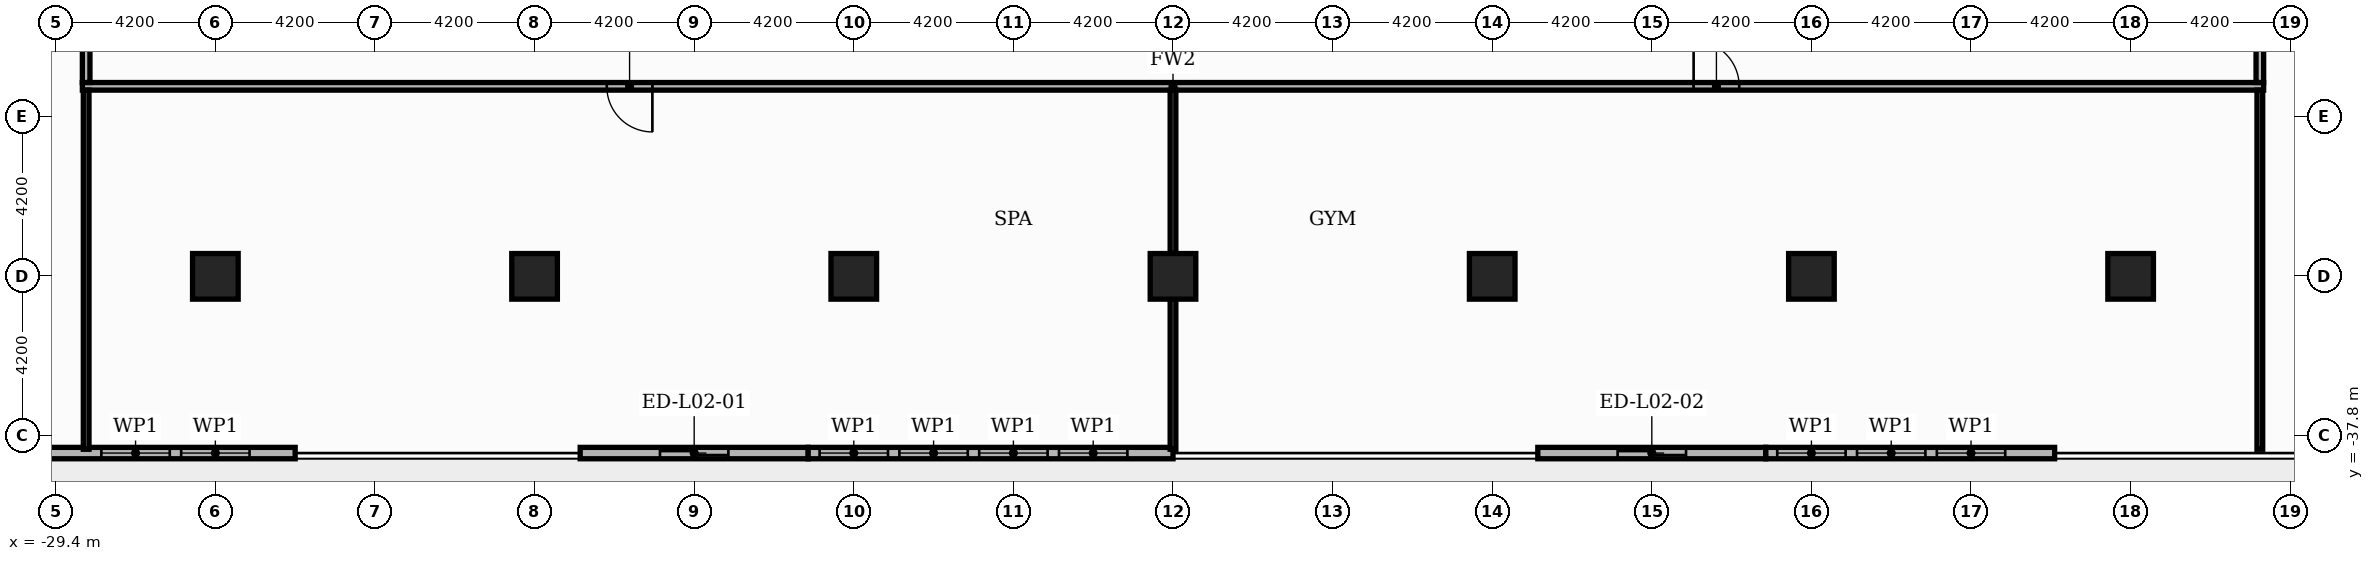
"""IFC4 building model, lengths in metres.
Left out: names, types, materials, properties, quantities, classifications, styles, units other than length and angle.
Written with IfcOpenShell. Run it as: python <this file> out.ifc"""

import sys

from ifc_helpers import new_model, si_unit, direction, frame, frame_2d, origin, origin_2d, place, context, subcontext, project, spatial, rectangle, extrude, element, fill, save


model = new_model("IFC4")
c1 = context("Model", 3, precision=1e-05, world=origin(), true_north=direction((0.0, 1.0)))
c2 = subcontext(c1, "Body", "Model", "MODEL_VIEW")
j1 = project(units=[si_unit("LENGTHUNIT", "METRE"), si_unit("PLANEANGLEUNIT", "RADIAN")], contexts=[c1])
p1 = place(None, origin())
s1 = spatial("IfcSite", under=j1, at=p1, CompositionType="ELEMENT")
p2 = place(p1, origin())
s2 = spatial("IfcBuilding", under=s1, at=p2, CompositionType="ELEMENT")
p3 = place(p2, frame((0.0, 0.0, 12.0)))
s3 = spatial("IfcBuildingStorey", under=s2, at=p3, CompositionType="ELEMENT", Elevation=12.0)
for number, where, z_axis, x_axis in (
    (1, (0.0, -33.6, 0.0), (0.0, 0.0, 1.0), (1.0, 0.0, 0.0)),
    (2, (8.4, -33.6, 0.0), (0.0, 0.0, 1.0), (1.0, 0.0, 0.0)),
    (3, (16.8, -33.6, 0.0), (0.0, 0.0, 1.0), (1.0, 0.0, 0.0)),
    (4, (25.2, -33.6, 0.0), (0.0, 0.0, 1.0), (1.0, 0.0, 0.0)),
    (5, (-8.4, -33.6, 0.0), (0.0, 0.0, 1.0), (1.0, 0.0, 0.0)),
    (6, (-16.8, -33.6, 0.0), (0.0, 0.0, 1.0), (1.0, 0.0, 0.0)),
    (7, (-25.2, -33.6, 0.0), (0.0, 0.0, 1.0), (1.0, 0.0, 0.0)),
):
    element("IfcColumn", number, at=place(p3, frame(where, z_axis=z_axis, x_axis=x_axis)), inside=s3, PredefinedType="COLUMN", context=c2, shape_type="SweptSolid", body=[
        extrude(rectangle(XDim=1.2, YDim=1.2, at=origin_2d()), origin(), (0.0, 0.0, 1.0), 4.8),
    ])
p4 = place(p3, frame((-30.6, -38.25, 0.0), z_axis=(0.0, 0.0, 1.0), x_axis=(1.0, 0.0, 0.0)))
e8 = element("IfcWall", 8, at=p4, inside=s3, PredefinedType="STANDARD", context=c2, shape_type="SweptSolid", body=[
    extrude(rectangle(XDim=7.5, YDim=0.3, at=frame_2d((3.75, 0.0))), origin(), (0.0, 0.0, 1.0), 4.38),
])
p5 = place(p4, frame((2.4, 0.0, 0.6)))
e9 = element("IfcOpeningElement", 9, at=p5, cuts=e8, PredefinedType="OPENING", context=c2, shape_type="SweptSolid", body=[
    extrude(rectangle(XDim=1.8, YDim=3.0, at=frame_2d((0.9, 1.5))), frame((0.0, 0.16, 0.0), z_axis=(0.0, -1.0, 0.0), x_axis=(1.0, 0.0, 0.0)), (0.0, 0.0, 1.0), 0.32),
])
p6 = place(p4, frame((4.5, 0.0, 0.6)))
e10 = element("IfcOpeningElement", 10, at=p6, cuts=e8, PredefinedType="OPENING", context=c2, shape_type="SweptSolid", body=[
    extrude(rectangle(XDim=1.8, YDim=3.0, at=frame_2d((0.9, 1.5))), frame((0.0, 0.16, 0.0), z_axis=(0.0, -1.0, 0.0), x_axis=(1.0, 0.0, 0.0)), (0.0, 0.0, 1.0), 0.32),
])
p7 = place(p3, frame((-15.6, -38.25, 0.0), z_axis=(0.0, 0.0, 1.0), x_axis=(1.0, 0.0, 0.0)))
e11 = element("IfcWall", 11, at=p7, inside=s3, PredefinedType="STANDARD", context=c2, shape_type="SweptSolid", body=[
    extrude(rectangle(XDim=6.0, YDim=0.3, at=frame_2d((3.0, 0.0))), origin(), (0.0, 0.0, 1.0), 4.38),
])
p8 = place(p7, frame((2.1, 0.0, 0.0)))
e12 = element("IfcOpeningElement", 12, at=p8, cuts=e11, PredefinedType="OPENING", context=c2, shape_type="SweptSolid", body=[
    extrude(rectangle(XDim=1.8, YDim=2.4, at=frame_2d((0.9, 1.2))), frame((0.0, 0.16, 0.0), z_axis=(0.0, -1.0, 0.0), x_axis=(1.0, 0.0, 0.0)), (0.0, 0.0, 1.0), 0.32),
])
p9 = place(p3, frame((-9.6, -38.25, 0.0), z_axis=(0.0, 0.0, 1.0), x_axis=(1.0, 0.0, 0.0)))
e13 = element("IfcWall", 13, at=p9, inside=s3, PredefinedType="STANDARD", context=c2, shape_type="SweptSolid", body=[
    extrude(rectangle(XDim=9.6, YDim=0.3, at=frame_2d((4.8, 0.0))), origin(), (0.0, 0.0, 1.0), 4.38),
])
p10 = place(p9, frame((0.3, 0.0, 0.6)))
e14 = element("IfcOpeningElement", 14, at=p10, cuts=e13, PredefinedType="OPENING", context=c2, shape_type="SweptSolid", body=[
    extrude(rectangle(XDim=1.8, YDim=3.0, at=frame_2d((0.9, 1.5))), frame((0.0, 0.16, 0.0), z_axis=(0.0, -1.0, 0.0), x_axis=(1.0, 0.0, 0.0)), (0.0, 0.0, 1.0), 0.32),
])
p11 = place(p9, frame((2.4, 0.0, 0.6)))
e15 = element("IfcOpeningElement", 15, at=p11, cuts=e13, PredefinedType="OPENING", context=c2, shape_type="SweptSolid", body=[
    extrude(rectangle(XDim=1.8, YDim=3.0, at=frame_2d((0.9, 1.5))), frame((0.0, 0.16, 0.0), z_axis=(0.0, -1.0, 0.0), x_axis=(1.0, 0.0, 0.0)), (0.0, 0.0, 1.0), 0.32),
])
p12 = place(p9, frame((4.5, 0.0, 0.6)))
e16 = element("IfcOpeningElement", 16, at=p12, cuts=e13, PredefinedType="OPENING", context=c2, shape_type="SweptSolid", body=[
    extrude(rectangle(XDim=1.8, YDim=3.0, at=frame_2d((0.9, 1.5))), frame((0.0, 0.16, 0.0), z_axis=(0.0, -1.0, 0.0), x_axis=(1.0, 0.0, 0.0)), (0.0, 0.0, 1.0), 0.32),
])
p13 = place(p9, frame((6.6, 0.0, 0.6)))
e17 = element("IfcOpeningElement", 17, at=p13, cuts=e13, PredefinedType="OPENING", context=c2, shape_type="SweptSolid", body=[
    extrude(rectangle(XDim=1.8, YDim=3.0, at=frame_2d((0.9, 1.5))), frame((0.0, 0.16, 0.0), z_axis=(0.0, -1.0, 0.0), x_axis=(1.0, 0.0, 0.0)), (0.0, 0.0, 1.0), 0.32),
])
p14 = place(p3, frame((9.6, -38.25, 0.0), z_axis=(0.0, 0.0, 1.0), x_axis=(1.0, 0.0, 0.0)))
e18 = element("IfcWall", 18, at=p14, inside=s3, PredefinedType="STANDARD", context=c2, shape_type="SweptSolid", body=[
    extrude(rectangle(XDim=6.0, YDim=0.3, at=frame_2d((3.0, 0.0))), origin(), (0.0, 0.0, 1.0), 4.38),
])
p15 = place(p14, frame((2.1, 0.0, 0.0)))
e19 = element("IfcOpeningElement", 19, at=p15, cuts=e18, PredefinedType="OPENING", context=c2, shape_type="SweptSolid", body=[
    extrude(rectangle(XDim=1.8, YDim=2.4, at=frame_2d((0.9, 1.2))), frame((0.0, 0.16, 0.0), z_axis=(0.0, -1.0, 0.0), x_axis=(1.0, 0.0, 0.0)), (0.0, 0.0, 1.0), 0.32),
])
p16 = place(p3, frame((15.6, -38.25, 0.0), z_axis=(0.0, 0.0, 1.0), x_axis=(1.0, 0.0, 0.0)))
e20 = element("IfcWall", 20, at=p16, inside=s3, PredefinedType="STANDARD", context=c2, shape_type="SweptSolid", body=[
    extrude(rectangle(XDim=7.6, YDim=0.3, at=frame_2d((3.8, 0.0))), origin(), (0.0, 0.0, 1.0), 4.38),
])
p17 = place(p16, frame((0.3, 0.0, 0.6)))
e21 = element("IfcOpeningElement", 21, at=p17, cuts=e20, PredefinedType="OPENING", context=c2, shape_type="SweptSolid", body=[
    extrude(rectangle(XDim=1.8, YDim=3.0, at=frame_2d((0.9, 1.5))), frame((0.0, 0.16, 0.0), z_axis=(0.0, -1.0, 0.0), x_axis=(1.0, 0.0, 0.0)), (0.0, 0.0, 1.0), 0.32),
])
p18 = place(p16, frame((2.4, 0.0, 0.6)))
e22 = element("IfcOpeningElement", 22, at=p18, cuts=e20, PredefinedType="OPENING", context=c2, shape_type="SweptSolid", body=[
    extrude(rectangle(XDim=1.8, YDim=3.0, at=frame_2d((0.9, 1.5))), frame((0.0, 0.16, 0.0), z_axis=(0.0, -1.0, 0.0), x_axis=(1.0, 0.0, 0.0)), (0.0, 0.0, 1.0), 0.32),
])
p19 = place(p16, frame((4.5, 0.0, 0.6)))
e23 = element("IfcOpeningElement", 23, at=p19, cuts=e20, PredefinedType="OPENING", context=c2, shape_type="SweptSolid", body=[
    extrude(rectangle(XDim=1.8, YDim=3.0, at=frame_2d((0.9, 1.5))), frame((0.0, 0.16, 0.0), z_axis=(0.0, -1.0, 0.0), x_axis=(1.0, 0.0, 0.0)), (0.0, 0.0, 1.0), 0.32),
])
p20 = place(p3, frame((-28.7, -28.6, 0.0), z_axis=(0.0, 0.0, 1.0), x_axis=(1.0, 0.0, 0.0)))
e24 = element("IfcWall", 24, at=p20, inside=s3, PredefinedType="PARTITIONING", context=c2, shape_type="SweptSolid", body=[
    extrude(rectangle(XDim=57.4, YDim=0.2, at=frame_2d((28.7, 0.0))), origin(), (0.0, 0.0, 1.0), 4.08),
])
p21 = place(p20, frame((13.8, 0.0, 0.0)))
e25 = element("IfcOpeningElement", 25, at=p21, cuts=e24, PredefinedType="OPENING", context=c2, shape_type="SweptSolid", body=[
    extrude(rectangle(XDim=1.2, YDim=2.2, at=frame_2d((0.6, 1.1))), frame((0.0, 0.11, 0.0), z_axis=(0.0, -1.0, 0.0), x_axis=(1.0, 0.0, 0.0)), (0.0, 0.0, 1.0), 0.22),
])
p22 = place(p20, frame((42.4, 0.0, 0.0)))
e26 = element("IfcOpeningElement", 26, at=p22, cuts=e24, PredefinedType="OPENING", context=c2, shape_type="SweptSolid", body=[
    extrude(rectangle(XDim=1.2, YDim=2.2, at=frame_2d((0.6, 1.1))), frame((0.0, 0.11, 0.0), z_axis=(0.0, -1.0, 0.0), x_axis=(1.0, 0.0, 0.0)), (0.0, 0.0, 1.0), 0.22),
])
p23 = place(p3, frame((-28.6, -38.15, 0.0), z_axis=(0.0, 0.0, 1.0), x_axis=(0.0, 1.0, 0.0)))
e27 = element("IfcWall", 27, at=p23, inside=s3, PredefinedType="PARTITIONING", context=c2, shape_type="SweptSolid", body=[
    extrude(rectangle(XDim=9.45, YDim=0.15, at=frame_2d((4.725, 0.0))), origin(), (0.0, 0.0, 1.0), 4.18),
])
p24 = place(p3, frame((-28.6, -28.5, 0.0), z_axis=(0.0, 0.0, 1.0), x_axis=(0.0, 1.0, 0.0)))
e28 = element("IfcWall", 28, at=p24, inside=s3, PredefinedType="PARTITIONING", context=c2, shape_type="SweptSolid", body=[
    extrude(rectangle(XDim=57.0, YDim=0.2, at=frame_2d((28.5, 0.0))), origin(), (0.0, 0.0, 1.0), 4.18),
])
p25 = place(p24, frame((9.4, 0.0, 0.0)))
e29 = element("IfcOpeningElement", 29, at=p25, cuts=e28, PredefinedType="OPENING", context=c2, shape_type="SweptSolid", body=[
    extrude(rectangle(XDim=1.2, YDim=2.2, at=frame_2d((0.6, 1.1))), frame((0.0, 0.11, 0.0), z_axis=(0.0, -1.0, 0.0), x_axis=(1.0, 0.0, 0.0)), (0.0, 0.0, 1.0), 0.22),
])
p26 = place(p24, frame((27.9, 0.0, 0.0)))
e30 = element("IfcOpeningElement", 30, at=p26, cuts=e28, PredefinedType="OPENING", context=c2, shape_type="SweptSolid", body=[
    extrude(rectangle(XDim=1.2, YDim=2.2, at=frame_2d((0.6, 1.1))), frame((0.0, 0.11, 0.0), z_axis=(0.0, -1.0, 0.0), x_axis=(1.0, 0.0, 0.0)), (0.0, 0.0, 1.0), 0.22),
])
p27 = place(p24, frame((46.4, 0.0, 0.0)))
e31 = element("IfcOpeningElement", 31, at=p27, cuts=e28, PredefinedType="OPENING", context=c2, shape_type="SweptSolid", body=[
    extrude(rectangle(XDim=1.2, YDim=2.2, at=frame_2d((0.6, 1.1))), frame((0.0, 0.11, 0.0), z_axis=(0.0, -1.0, 0.0), x_axis=(1.0, 0.0, 0.0)), (0.0, 0.0, 1.0), 0.22),
])
p28 = place(p3, frame((0.0, -38.15, 0.0), z_axis=(0.0, 0.0, 1.0), x_axis=(0.0, 1.0, 0.0)))
e32 = element("IfcWall", 32, at=p28, inside=s3, PredefinedType="PARTITIONING", context=c2, shape_type="SweptSolid", body=[
    extrude(rectangle(XDim=3.95, YDim=0.15, at=frame_2d((1.975, 0.0))), origin(), (0.0, 0.0, 1.0), 4.08),
])
p29 = place(p3, frame((0.0, -33.0, 0.0), z_axis=(0.0, 0.0, 1.0), x_axis=(0.0, 1.0, 0.0)))
e33 = element("IfcWall", 33, at=p29, inside=s3, PredefinedType="PARTITIONING", context=c2, shape_type="SweptSolid", body=[
    extrude(rectangle(XDim=4.3, YDim=0.15, at=frame_2d((2.15, 0.0))), origin(), (0.0, 0.0, 1.0), 4.08),
])
p30 = place(p3, frame((28.6, -38.15, 0.0), z_axis=(0.0, 0.0, 1.0), x_axis=(0.0, 1.0, 0.0)))
e34 = element("IfcWall", 34, at=p30, inside=s3, PredefinedType="PARTITIONING", context=c2, shape_type="SweptSolid", body=[
    extrude(rectangle(XDim=9.45, YDim=0.15, at=frame_2d((4.725, 0.0))), origin(), (0.0, 0.0, 1.0), 4.18),
])
p31 = place(p3, frame((28.6, -28.5, 0.0), z_axis=(0.0, 0.0, 1.0), x_axis=(0.0, 1.0, 0.0)))
e35 = element("IfcWall", 35, at=p31, inside=s3, PredefinedType="PARTITIONING", context=c2, shape_type="SweptSolid", body=[
    extrude(rectangle(XDim=57.0, YDim=0.2, at=frame_2d((28.5, 0.0))), origin(), (0.0, 0.0, 1.0), 4.18),
])
p32 = place(p31, frame((7.3, 0.0, 0.0)))
e36 = element("IfcOpeningElement", 36, at=p32, cuts=e35, PredefinedType="OPENING", context=c2, shape_type="SweptSolid", body=[
    extrude(rectangle(XDim=1.2, YDim=2.2, at=frame_2d((0.6, 1.1))), frame((0.0, 0.11, 0.0), z_axis=(0.0, -1.0, 0.0), x_axis=(1.0, 0.0, 0.0)), (0.0, 0.0, 1.0), 0.22),
])
p33 = place(p31, frame((21.6, 0.0, 0.0)))
e37 = element("IfcOpeningElement", 37, at=p33, cuts=e35, PredefinedType="OPENING", context=c2, shape_type="SweptSolid", body=[
    extrude(rectangle(XDim=1.2, YDim=2.2, at=frame_2d((0.6, 1.1))), frame((0.0, 0.11, 0.0), z_axis=(0.0, -1.0, 0.0), x_axis=(1.0, 0.0, 0.0)), (0.0, 0.0, 1.0), 0.22),
])
p34 = place(p31, frame((34.2, 0.0, 0.0)))
e38 = element("IfcOpeningElement", 38, at=p34, cuts=e35, PredefinedType="OPENING", context=c2, shape_type="SweptSolid", body=[
    extrude(rectangle(XDim=1.2, YDim=2.2, at=frame_2d((0.6, 1.1))), frame((0.0, 0.11, 0.0), z_axis=(0.0, -1.0, 0.0), x_axis=(1.0, 0.0, 0.0)), (0.0, 0.0, 1.0), 0.22),
])
p35 = place(p31, frame((46.8, 0.0, 0.0)))
e39 = element("IfcOpeningElement", 39, at=p35, cuts=e35, PredefinedType="OPENING", context=c2, shape_type="SweptSolid", body=[
    extrude(rectangle(XDim=1.2, YDim=2.2, at=frame_2d((0.6, 1.1))), frame((0.0, 0.11, 0.0), z_axis=(0.0, -1.0, 0.0), x_axis=(1.0, 0.0, 0.0)), (0.0, 0.0, 1.0), 0.22),
])
p36 = place(p31, frame((54.8, 0.0, 0.0)))
e40 = element("IfcOpeningElement", 40, at=p36, cuts=e35, PredefinedType="OPENING", context=c2, shape_type="SweptSolid", body=[
    extrude(rectangle(XDim=1.2, YDim=2.2, at=frame_2d((0.6, 1.1))), frame((0.0, 0.11, 0.0), z_axis=(0.0, -1.0, 0.0), x_axis=(1.0, 0.0, 0.0)), (0.0, 0.0, 1.0), 0.22),
])
p37 = place(p5, origin())
e41 = element("IfcWindow", 41, at=p37, inside=s3, PartitioningType="SINGLE_PANEL", PredefinedType="WINDOW", context=c2, shape_type="SweptSolid", body=[
    extrude(rectangle(XDim=1.8, YDim=3.0, at=frame_2d((0.9, 1.5))), frame((0.0, 0.03, 0.0), z_axis=(0.0, -1.0, 0.0), x_axis=(1.0, 0.0, 0.0)), (0.0, 0.0, 1.0), 0.06),
])
fill(e9, e41)
p38 = place(p6, origin())
e42 = element("IfcWindow", 42, at=p38, inside=s3, PartitioningType="SINGLE_PANEL", PredefinedType="WINDOW", context=c2, shape_type="SweptSolid", body=[
    extrude(rectangle(XDim=1.8, YDim=3.0, at=frame_2d((0.9, 1.5))), frame((0.0, 0.03, 0.0), z_axis=(0.0, -1.0, 0.0), x_axis=(1.0, 0.0, 0.0)), (0.0, 0.0, 1.0), 0.06),
])
fill(e10, e42)
p39 = place(p8, origin())
e43 = element("IfcDoor", 43, at=p39, inside=s3, OperationType="SLIDING_TO_RIGHT", PredefinedType="DOOR", context=c2, shape_type="SweptSolid", body=[
    extrude(rectangle(XDim=1.8, YDim=2.4, at=frame_2d((0.9, 1.2))), frame((0.0, 0.025, 0.0), z_axis=(0.0, -1.0, 0.0), x_axis=(1.0, 0.0, 0.0)), (0.0, 0.0, 1.0), 0.05),
])
fill(e12, e43)
p40 = place(p10, origin())
e44 = element("IfcWindow", 44, at=p40, inside=s3, PartitioningType="SINGLE_PANEL", PredefinedType="WINDOW", context=c2, shape_type="SweptSolid", body=[
    extrude(rectangle(XDim=1.8, YDim=3.0, at=frame_2d((0.9, 1.5))), frame((0.0, 0.03, 0.0), z_axis=(0.0, -1.0, 0.0), x_axis=(1.0, 0.0, 0.0)), (0.0, 0.0, 1.0), 0.06),
])
fill(e14, e44)
p41 = place(p11, origin())
e45 = element("IfcWindow", 45, at=p41, inside=s3, PartitioningType="SINGLE_PANEL", PredefinedType="WINDOW", context=c2, shape_type="SweptSolid", body=[
    extrude(rectangle(XDim=1.8, YDim=3.0, at=frame_2d((0.9, 1.5))), frame((0.0, 0.03, 0.0), z_axis=(0.0, -1.0, 0.0), x_axis=(1.0, 0.0, 0.0)), (0.0, 0.0, 1.0), 0.06),
])
fill(e15, e45)
p42 = place(p12, origin())
e46 = element("IfcWindow", 46, at=p42, inside=s3, PartitioningType="SINGLE_PANEL", PredefinedType="WINDOW", context=c2, shape_type="SweptSolid", body=[
    extrude(rectangle(XDim=1.8, YDim=3.0, at=frame_2d((0.9, 1.5))), frame((0.0, 0.03, 0.0), z_axis=(0.0, -1.0, 0.0), x_axis=(1.0, 0.0, 0.0)), (0.0, 0.0, 1.0), 0.06),
])
fill(e16, e46)
p43 = place(p13, origin())
e47 = element("IfcWindow", 47, at=p43, inside=s3, PartitioningType="SINGLE_PANEL", PredefinedType="WINDOW", context=c2, shape_type="SweptSolid", body=[
    extrude(rectangle(XDim=1.8, YDim=3.0, at=frame_2d((0.9, 1.5))), frame((0.0, 0.03, 0.0), z_axis=(0.0, -1.0, 0.0), x_axis=(1.0, 0.0, 0.0)), (0.0, 0.0, 1.0), 0.06),
])
fill(e17, e47)
p44 = place(p15, origin())
e48 = element("IfcDoor", 48, at=p44, inside=s3, OperationType="SLIDING_TO_RIGHT", PredefinedType="DOOR", context=c2, shape_type="SweptSolid", body=[
    extrude(rectangle(XDim=1.8, YDim=2.4, at=frame_2d((0.9, 1.2))), frame((0.0, 0.025, 0.0), z_axis=(0.0, -1.0, 0.0), x_axis=(1.0, 0.0, 0.0)), (0.0, 0.0, 1.0), 0.05),
])
fill(e19, e48)
p45 = place(p17, origin())
e49 = element("IfcWindow", 49, at=p45, inside=s3, PartitioningType="SINGLE_PANEL", PredefinedType="WINDOW", context=c2, shape_type="SweptSolid", body=[
    extrude(rectangle(XDim=1.8, YDim=3.0, at=frame_2d((0.9, 1.5))), frame((0.0, 0.03, 0.0), z_axis=(0.0, -1.0, 0.0), x_axis=(1.0, 0.0, 0.0)), (0.0, 0.0, 1.0), 0.06),
])
fill(e21, e49)
p46 = place(p18, origin())
e50 = element("IfcWindow", 50, at=p46, inside=s3, PartitioningType="SINGLE_PANEL", PredefinedType="WINDOW", context=c2, shape_type="SweptSolid", body=[
    extrude(rectangle(XDim=1.8, YDim=3.0, at=frame_2d((0.9, 1.5))), frame((0.0, 0.03, 0.0), z_axis=(0.0, -1.0, 0.0), x_axis=(1.0, 0.0, 0.0)), (0.0, 0.0, 1.0), 0.06),
])
fill(e22, e50)
p47 = place(p19, origin())
e51 = element("IfcWindow", 51, at=p47, inside=s3, PartitioningType="SINGLE_PANEL", PredefinedType="WINDOW", context=c2, shape_type="SweptSolid", body=[
    extrude(rectangle(XDim=1.8, YDim=3.0, at=frame_2d((0.9, 1.5))), frame((0.0, 0.03, 0.0), z_axis=(0.0, -1.0, 0.0), x_axis=(1.0, 0.0, 0.0)), (0.0, 0.0, 1.0), 0.06),
])
fill(e23, e51)
p48 = place(p21, origin())
e52 = element("IfcDoor", 52, at=p48, inside=s3, OperationType="SINGLE_SWING_RIGHT", PredefinedType="DOOR", context=c2, shape_type="SweptSolid", body=[
    extrude(rectangle(XDim=1.2, YDim=2.2, at=frame_2d((0.6, 1.1))), frame((0.0, 0.025, 0.0), z_axis=(0.0, -1.0, 0.0), x_axis=(1.0, 0.0, 0.0)), (0.0, 0.0, 1.0), 0.05),
])
fill(e25, e52)
p49 = place(p22, origin())
e53 = element("IfcDoor", 53, at=p49, inside=s3, OperationType="SINGLE_SWING_LEFT", PredefinedType="DOOR", context=c2, shape_type="SweptSolid", body=[
    extrude(rectangle(XDim=1.2, YDim=2.2, at=frame_2d((0.6, 1.1))), frame((0.0, 0.025, 0.0), z_axis=(0.0, -1.0, 0.0), x_axis=(1.0, 0.0, 0.0)), (0.0, 0.0, 1.0), 0.05),
])
fill(e26, e53)
save(model, sys.argv[1])
